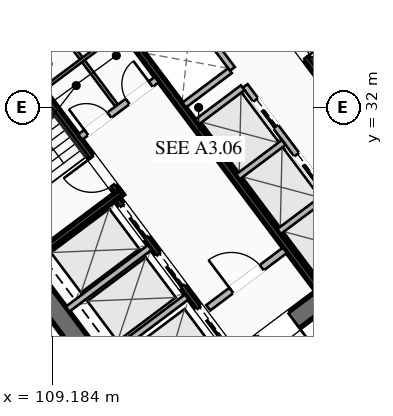
"""IFC4 building model, lengths in metres.
Left out: names, types, materials, properties, quantities, classifications, styles, units other than length and angle.
Written with IfcOpenShell. Run it as: python <this file> out.ifc"""

import sys

from ifc_helpers import new_model, si_unit, direction, frame, frame_2d, origin, place, context, subcontext, project, spatial, rectangle, extrude, element, fill, save


model = new_model("IFC4")
c1 = context("Model", 3, precision=1e-05, world=origin(), true_north=direction((0.0, 1.0)))
c2 = subcontext(c1, "Body", "Model", "MODEL_VIEW")
j1 = project(units=[si_unit("LENGTHUNIT", "METRE"), si_unit("PLANEANGLEUNIT", "RADIAN")], contexts=[c1])
p1 = place(None, origin())
s1 = spatial("IfcSite", under=j1, at=p1, CompositionType="ELEMENT")
p2 = place(p1, origin())
s2 = spatial("IfcBuilding", under=s1, at=p2, CompositionType="ELEMENT")
p3 = place(p2, frame((0.0, 0.0, 45.9)))
s3 = spatial("IfcBuildingStorey", under=s2, at=p3, CompositionType="ELEMENT", Elevation=45.9)
for number, where, z_axis, x_axis in (
    (1, (112.476, 21.107, 0.0), (0.0, 0.0, 1.0), (-0.6, 0.8, 0.0)),
    (2, (115.524, 42.893, 0.0), (0.0, 0.0, 1.0), (0.6, -0.8, 0.0)),
):
    element("IfcWall", number, at=place(p3, frame(where, z_axis=z_axis, x_axis=x_axis)), inside=s3, PredefinedType="SHEAR", context=c2, shape_type="SweptSolid", body=[
        extrude(rectangle(XDim=15.6, YDim=0.65, at=frame_2d((7.8, 0.0))), origin(), (0.0, 0.0, 1.0), 3.55),
    ])
p4 = place(p3, frame((124.429, 30.478, 0.0), z_axis=(0.0, 0.0, 1.0), x_axis=(-0.799998028465, -0.600002628705, 0.0)))
e3 = element("IfcWall", 3, at=p4, inside=s3, PredefinedType="SHEAR", context=c2, shape_type="SweptSolid", body=[
    extrude(rectangle(XDim=14.86, YDim=0.65, at=frame_2d((7.43, 0.0))), origin(), (0.0, 0.0, 1.0), 3.55),
])
p5 = place(p4, frame((9.13, 0.0, 0.0)))
e4 = element("IfcOpeningElement", 4, at=p5, cuts=e3, PredefinedType="OPENING", context=c2, shape_type="SweptSolid", body=[
    extrude(rectangle(XDim=1.25, YDim=2.25, at=frame_2d((0.625, 1.125))), frame((0.0, 0.335, 0.0), z_axis=(0.0, -1.0, 0.0), x_axis=(1.0, 0.0, 0.0)), (0.0, 0.0, 1.0), 0.67),
])
p6 = place(p4, frame((4.08, 0.0, 0.0)))
e5 = element("IfcOpeningElement", 5, at=p6, cuts=e3, PredefinedType="OPENING", context=c2, shape_type="SweptSolid", body=[
    extrude(rectangle(XDim=1.25, YDim=2.25, at=frame_2d((0.625, 1.125))), frame((0.0, 0.335, 0.0), z_axis=(0.0, -1.0, 0.0), x_axis=(1.0, 0.0, 0.0)), (0.0, 0.0, 1.0), 0.67),
])
p7 = place(p3, frame((103.571, 33.522, 0.0), z_axis=(0.0, 0.0, 1.0), x_axis=(0.799998028465, 0.600002628705, 0.0)))
e6 = element("IfcWall", 6, at=p7, inside=s3, PredefinedType="SHEAR", context=c2, shape_type="SweptSolid", body=[
    extrude(rectangle(XDim=14.86, YDim=0.65, at=frame_2d((7.43, 0.0))), origin(), (0.0, 0.0, 1.0), 3.55),
])
p8 = place(p7, frame((4.48, 0.0, 0.0)))
e7 = element("IfcOpeningElement", 7, at=p8, cuts=e6, PredefinedType="OPENING", context=c2, shape_type="SweptSolid", body=[
    extrude(rectangle(XDim=1.25, YDim=2.25, at=frame_2d((0.625, 1.125))), frame((0.0, 0.335, 0.0), z_axis=(0.0, -1.0, 0.0), x_axis=(1.0, 0.0, 0.0)), (0.0, 0.0, 1.0), 0.67),
])
p9 = place(p7, frame((9.53, 0.0, 0.0)))
e8 = element("IfcOpeningElement", 8, at=p9, cuts=e6, PredefinedType="OPENING", context=c2, shape_type="SweptSolid", body=[
    extrude(rectangle(XDim=1.25, YDim=2.25, at=frame_2d((0.625, 1.125))), frame((0.0, 0.335, 0.0), z_axis=(0.0, -1.0, 0.0), x_axis=(1.0, 0.0, 0.0)), (0.0, 0.0, 1.0), 0.67),
])
p10 = place(p3, frame((111.44, 29.08, 0.0), z_axis=(0.0, 0.0, 1.0), x_axis=(-0.600009827119, 0.799992629566, 0.0)))
e9 = element("IfcWall", 9, at=p10, inside=s3, PredefinedType="SHEAR", context=c2, shape_type="SweptSolid", body=[
    extrude(rectangle(XDim=7.95, YDim=0.2, at=frame_2d((3.975, 0.0))), origin(), (0.0, 0.0, 1.0), 3.35),
])
p11 = place(p10, frame((0.45, 0.0, 0.0)))
e10 = element("IfcOpeningElement", 10, at=p11, cuts=e9, PredefinedType="OPENING", context=c2, shape_type="SweptSolid", body=[
    extrude(rectangle(XDim=1.15, YDim=2.2, at=frame_2d((0.575, 1.1))), frame((0.0, 0.11, 0.0), z_axis=(0.0, -1.0, 0.0), x_axis=(1.0, 0.0, 0.0)), (0.0, 0.0, 1.0), 0.22),
])
p12 = place(p3, frame((108.476, 26.982, 0.0), z_axis=(0.0, 0.0, 1.0), x_axis=(0.799984290658, 0.600020945218, 0.0)))
e11 = element("IfcWall", 11, at=p12, inside=s3, PredefinedType="SHEAR", context=c2, shape_type="SweptSolid", body=[
    extrude(rectangle(XDim=3.73, YDim=0.2, at=frame_2d((1.865, 0.0))), origin(), (0.0, 0.0, 1.0), 3.35),
])
p13 = place(p3, frame((116.56, 34.92, 0.0), z_axis=(0.0, 0.0, 1.0), x_axis=(0.600009827119, -0.799992629566, 0.0)))
e12 = element("IfcWall", 12, at=p13, inside=s3, PredefinedType="SHEAR", context=c2, shape_type="SweptSolid", body=[
    extrude(rectangle(XDim=7.95, YDim=0.2, at=frame_2d((3.975, 0.0))), origin(), (0.0, 0.0, 1.0), 3.35),
])
p14 = place(p13, frame((0.45, 0.0, 0.0)))
e13 = element("IfcOpeningElement", 13, at=p14, cuts=e12, PredefinedType="OPENING", context=c2, shape_type="SweptSolid", body=[
    extrude(rectangle(XDim=1.15, YDim=2.2, at=frame_2d((0.575, 1.1))), frame((0.0, 0.11, 0.0), z_axis=(0.0, -1.0, 0.0), x_axis=(1.0, 0.0, 0.0)), (0.0, 0.0, 1.0), 0.22),
])
p15 = place(p3, frame((117.938, 26.016, 0.0), z_axis=(0.0, 0.0, 1.0), x_axis=(-0.600005463273, 0.799995902516, 0.0)))
e14 = element("IfcWall", 14, at=p15, inside=s3, PredefinedType="SHEAR", context=c2, shape_type="SweptSolid", body=[
    extrude(rectangle(XDim=14.3, YDim=0.2, at=frame_2d((7.15, 0.0))), origin(), (0.0, 0.0, 1.0), 3.35),
])
p16 = place(p3, frame((110.104, 31.028, 0.0), z_axis=(0.0, 0.0, 1.0), x_axis=(0.800018601094, 0.59997519774, 0.0)))
e15 = element("IfcWall", 15, at=p16, inside=s3, PredefinedType="SOLIDWALL", context=c2, shape_type="SweptSolid", body=[
    extrude(rectangle(XDim=3.15, YDim=0.22, at=frame_2d((1.575, 0.0))), origin(), (0.0, 0.0, 1.0), 2.703),
])
p17 = place(p16, frame((0.25, 0.0, 0.0)))
e16 = element("IfcOpeningElement", 16, at=p17, cuts=e15, PredefinedType="OPENING", context=c2, shape_type="SweptSolid", body=[
    extrude(rectangle(XDim=0.95, YDim=2.05, at=frame_2d((0.475, 1.025))), frame((0.0, 0.12, 0.0), z_axis=(0.0, -1.0, 0.0), x_axis=(1.0, 0.0, 0.0)), (0.0, 0.0, 1.0), 0.24),
])
p18 = place(p16, frame((1.95, 0.0, 0.0)))
e17 = element("IfcOpeningElement", 17, at=p18, cuts=e15, PredefinedType="OPENING", context=c2, shape_type="SweptSolid", body=[
    extrude(rectangle(XDim=0.95, YDim=2.05, at=frame_2d((0.475, 1.025))), frame((0.0, 0.12, 0.0), z_axis=(0.0, -1.0, 0.0), x_axis=(1.0, 0.0, 0.0)), (0.0, 0.0, 1.0), 0.24),
])
p19 = place(p3, frame((114.316, 25.412, 0.0), z_axis=(0.0, 0.0, 1.0), x_axis=(0.800018601094, 0.59997519774, 0.0)))
e18 = element("IfcWall", 18, at=p19, inside=s3, PredefinedType="SOLIDWALL", context=c2, shape_type="SweptSolid", body=[
    extrude(rectangle(XDim=3.15, YDim=0.22, at=frame_2d((1.575, 0.0))), origin(), (0.0, 0.0, 1.0), 2.703),
])
p20 = place(p19, frame((0.95, 0.0, 0.0)))
e19 = element("IfcOpeningElement", 19, at=p20, cuts=e18, PredefinedType="OPENING", context=c2, shape_type="SweptSolid", body=[
    extrude(rectangle(XDim=1.25, YDim=2.25, at=frame_2d((0.625, 1.125))), frame((0.0, 0.12, 0.0), z_axis=(0.0, -1.0, 0.0), x_axis=(1.0, 0.0, 0.0)), (0.0, 0.0, 1.0), 0.24),
])
p21 = place(p3, frame((115.13, 23.91, 0.0), z_axis=(0.0, 0.0, 1.0), x_axis=(-0.599975393228, 0.800018454488, 0.0)))
e20 = element("IfcWall", 20, at=p21, inside=s3, PredefinedType="SHEAR", context=c2, shape_type="SweptSolid", body=[
    extrude(rectangle(XDim=6.35, YDim=0.2, at=frame_2d((3.175, 0.0))), origin(), (0.0, 0.0, 1.0), 3.35),
])
p22 = place(p21, frame((4.775, 0.0, 0.0)))
e21 = element("IfcOpeningElement", 21, at=p22, cuts=e20, PredefinedType="OPENING", context=c2, shape_type="SweptSolid", body=[
    extrude(rectangle(XDim=1.3, YDim=2.25, at=frame_2d((0.65, 1.125))), frame((0.0, 0.11, 0.0), z_axis=(0.0, -1.0, 0.0), x_axis=(1.0, 0.0, 0.0)), (0.0, 0.0, 1.0), 0.22),
])
p23 = place(p21, frame((2.775, 0.0, 0.0)))
e22 = element("IfcOpeningElement", 22, at=p23, cuts=e20, PredefinedType="OPENING", context=c2, shape_type="SweptSolid", body=[
    extrude(rectangle(XDim=1.3, YDim=2.25, at=frame_2d((0.65, 1.125))), frame((0.0, 0.11, 0.0), z_axis=(0.0, -1.0, 0.0), x_axis=(1.0, 0.0, 0.0)), (0.0, 0.0, 1.0), 0.22),
])
p24 = place(p21, frame((0.575, 0.0, 0.0)))
e23 = element("IfcOpeningElement", 23, at=p24, cuts=e20, PredefinedType="OPENING", context=c2, shape_type="SweptSolid", body=[
    extrude(rectangle(XDim=1.3, YDim=2.25, at=frame_2d((0.65, 1.125))), frame((0.0, 0.11, 0.0), z_axis=(0.0, -1.0, 0.0), x_axis=(1.0, 0.0, 0.0)), (0.0, 0.0, 1.0), 0.22),
])
for number, where, z_axis, x_axis in (
    (24, (110.906, 23.742, 0.0), (0.0, 0.0, 1.0), (0.8, 0.6, 0.0)),
    (25, (109.688, 25.366, 0.0), (0.0, 0.0, 1.0), (0.8, 0.6, 0.0)),
):
    element("IfcWall", number, at=place(p3, frame(where, z_axis=z_axis, x_axis=x_axis)), inside=s3, PredefinedType="SOLIDWALL", context=c2, shape_type="SweptSolid", body=[
        extrude(rectangle(XDim=3.38, YDim=0.2, at=frame_2d((1.69, 0.0))), origin(), (0.0, 0.0, 1.0), 3.35),
    ])
p25 = place(p3, frame((111.296, 32.072, 0.0), z_axis=(0.0, 0.0, 1.0), x_axis=(-0.59995887973, 0.800030838552, 0.0)))
e26 = element("IfcWall", 26, at=p25, inside=s3, PredefinedType="PARTITIONING", context=c2, shape_type="SweptSolid", body=[
    extrude(rectangle(XDim=3.8, YDim=0.11, at=frame_2d((1.9, 0.0))), origin(), (0.0, 0.0, 1.0), 2.703),
])
p26 = place(p3, frame((108.91, 32.62, 0.0), z_axis=(0.0, 0.0, 1.0), x_axis=(0.800018601094, 0.59997519774, 0.0)))
e27 = element("IfcWall", 27, at=p26, inside=s3, PredefinedType="PARTITIONING", context=c2, shape_type="SweptSolid", body=[
    extrude(rectangle(XDim=3.15, YDim=0.11, at=frame_2d((1.575, 0.0))), origin(), (0.0, 0.0, 1.0), 2.703),
])
p27 = place(p3, frame((119.61, 27.27, 0.0), z_axis=(0.0, 0.0, 1.0), x_axis=(-0.600011488909, 0.79999138319, 0.0)))
e28 = element("IfcWall", 28, at=p27, inside=s3, PredefinedType="SOLIDWALL", context=c2, shape_type="SweptSolid", body=[
    extrude(rectangle(XDim=6.8, YDim=0.2, at=frame_2d((3.4, 0.0))), origin(), (0.0, 0.0, 1.0), 3.35),
])
p28 = place(p27, frame((0.625, 0.0, 0.0)))
e29 = element("IfcOpeningElement", 29, at=p28, cuts=e28, PredefinedType="OPENING", context=c2, shape_type="SweptSolid", body=[
    extrude(rectangle(XDim=1.1, YDim=2.2, at=frame_2d((0.55, 1.1))), frame((0.0, 0.11, 0.0), z_axis=(0.0, -1.0, 0.0), x_axis=(1.0, 0.0, 0.0)), (0.0, 0.0, 1.0), 0.22),
])
p29 = place(p27, frame((2.875, 0.0, 0.0)))
e30 = element("IfcOpeningElement", 30, at=p29, cuts=e28, PredefinedType="OPENING", context=c2, shape_type="SweptSolid", body=[
    extrude(rectangle(XDim=1.1, YDim=2.2, at=frame_2d((0.55, 1.1))), frame((0.0, 0.11, 0.0), z_axis=(0.0, -1.0, 0.0), x_axis=(1.0, 0.0, 0.0)), (0.0, 0.0, 1.0), 0.22),
])
p30 = place(p27, frame((5.125, 0.0, 0.0)))
e31 = element("IfcOpeningElement", 31, at=p30, cuts=e28, PredefinedType="OPENING", context=c2, shape_type="SweptSolid", body=[
    extrude(rectangle(XDim=1.1, YDim=2.2, at=frame_2d((0.55, 1.1))), frame((0.0, 0.11, 0.0), z_axis=(0.0, -1.0, 0.0), x_axis=(1.0, 0.0, 0.0)), (0.0, 0.0, 1.0), 0.22),
])
p31 = place(p3, frame((116.646, 27.922, 0.0), z_axis=(0.0, 0.0, 1.0), x_axis=(0.8, 0.6, 0.0)))
e32 = element("IfcWall", 32, at=p31, inside=s3, PredefinedType="SOLIDWALL", context=c2, shape_type="SweptSolid", body=[
    extrude(rectangle(XDim=1.88, YDim=0.2, at=frame_2d((0.94, 0.0))), origin(), (0.0, 0.0, 1.0), 3.35),
])
p32 = place(p3, frame((115.296, 29.722, 0.0), z_axis=(0.0, 0.0, 1.0), x_axis=(0.799984418148, 0.600020775241, 0.0)))
e33 = element("IfcWall", 33, at=p32, inside=s3, PredefinedType="SOLIDWALL", context=c2, shape_type="SweptSolid", body=[
    extrude(rectangle(XDim=1.88, YDim=0.2, at=frame_2d((0.94, 0.0))), origin(), (0.0, 0.0, 1.0), 3.35),
])
p33 = place(p3, frame((113.946, 31.522, 0.0), z_axis=(0.0, 0.0, 1.0), x_axis=(0.8, 0.6, 0.0)))
e34 = element("IfcWall", 34, at=p33, inside=s3, PredefinedType="SOLIDWALL", context=c2, shape_type="SweptSolid", body=[
    extrude(rectangle(XDim=1.88, YDim=0.2, at=frame_2d((0.94, 0.0))), origin(), (0.0, 0.0, 1.0), 3.35),
])
p34 = place(p3, frame((115.11, 33.27, 0.0), z_axis=(0.0, 0.0, 1.0), x_axis=(-0.600011488909, 0.79999138319, 0.0)))
e35 = element("IfcWall", 35, at=p34, inside=s3, PredefinedType="SOLIDWALL", context=c2, shape_type="SweptSolid", body=[
    extrude(rectangle(XDim=6.8, YDim=0.2, at=frame_2d((3.4, 0.0))), origin(), (0.0, 0.0, 1.0), 3.35),
])
p35 = place(p3, frame((113.526, 32.082, 0.0), z_axis=(0.0, 0.0, 1.0), x_axis=(0.800046745961, 0.599937666993, 0.0)))
e36 = element("IfcWall", 36, at=p35, inside=s3, PredefinedType="SOLIDWALL", context=c2, shape_type="SweptSolid", body=[
    extrude(rectangle(XDim=1.88, YDim=0.2, at=frame_2d((0.94, 0.0))), origin(), (0.0, 0.0, 1.0), 3.35),
])
p36 = place(p3, frame((112.176, 33.882, 0.0), z_axis=(0.0, 0.0, 1.0), x_axis=(0.8, 0.6, 0.0)))
e37 = element("IfcWall", 37, at=p36, inside=s3, PredefinedType="SOLIDWALL", context=c2, shape_type="SweptSolid", body=[
    extrude(rectangle(XDim=1.88, YDim=0.2, at=frame_2d((0.94, 0.0))), origin(), (0.0, 0.0, 1.0), 3.35),
])
p37 = place(p3, frame((135.46, 34.47, 0.0), z_axis=(0.0, 0.0, 1.0), x_axis=(-0.800000982127, -0.599998690494, 0.0)))
e38 = element("IfcWall", 38, at=p37, inside=s3, PredefinedType="PARTITIONING", context=c2, shape_type="SweptSolid", body=[
    extrude(rectangle(XDim=29.83, YDim=0.135, at=frame_2d((14.915, 0.0))), origin(), (0.0, 0.0, 1.0), 2.703),
])
p38 = place(p37, frame((28.5, 0.0, 0.0)))
e39 = element("IfcOpeningElement", 39, at=p38, cuts=e38, PredefinedType="OPENING", context=c2, shape_type="SweptSolid", body=[
    extrude(rectangle(XDim=0.95, YDim=2.05, at=frame_2d((0.475, 1.025))), frame((0.0, 0.077, 0.0), z_axis=(0.0, -1.0, 0.0), x_axis=(1.0, 0.0, 0.0)), (0.0, 0.0, 1.0), 0.155),
])
p39 = place(p37, frame((17.892, 0.0, 0.0)))
e40 = element("IfcOpeningElement", 40, at=p39, cuts=e38, PredefinedType="OPENING", context=c2, shape_type="SweptSolid", body=[
    extrude(rectangle(XDim=0.95, YDim=2.05, at=frame_2d((0.475, 1.025))), frame((0.0, 0.077, 0.0), z_axis=(0.0, -1.0, 0.0), x_axis=(1.0, 0.0, 0.0)), (0.0, 0.0, 1.0), 0.155),
])
p40 = place(p37, frame((0.38, 0.0, 0.0)))
e41 = element("IfcOpeningElement", 41, at=p40, cuts=e38, PredefinedType="OPENING", context=c2, shape_type="SweptSolid", body=[
    extrude(rectangle(XDim=0.95, YDim=2.05, at=frame_2d((0.475, 1.025))), frame((0.0, 0.077, 0.0), z_axis=(0.0, -1.0, 0.0), x_axis=(1.0, 0.0, 0.0)), (0.0, 0.0, 1.0), 0.155),
])
p41 = place(p3, frame((111.548, 16.636, 0.0), z_axis=(0.0, 0.0, 1.0), x_axis=(-0.600003610192, 0.799997292343, 0.0)))
e42 = element("IfcWall", 42, at=p41, inside=s3, PredefinedType="PARTITIONING", context=c2, shape_type="SweptSolid", body=[
    extrude(rectangle(XDim=21.64, YDim=0.135, at=frame_2d((10.82, 0.0))), origin(), (0.0, 0.0, 1.0), 2.703),
])
p42 = place(p41, frame((0.3, 0.0, 0.0)))
e43 = element("IfcOpeningElement", 43, at=p42, cuts=e42, PredefinedType="OPENING", context=c2, shape_type="SweptSolid", body=[
    extrude(rectangle(XDim=0.95, YDim=2.05, at=frame_2d((0.475, 1.025))), frame((0.0, 0.077, 0.0), z_axis=(0.0, -1.0, 0.0), x_axis=(1.0, 0.0, 0.0)), (0.0, 0.0, 1.0), 0.155),
])
p43 = place(p5, origin())
e44 = element("IfcDoor", 44, at=p43, inside=s3, OperationType="SINGLE_SWING_LEFT", PredefinedType="DOOR", context=c2, shape_type="SweptSolid", body=[
    extrude(rectangle(XDim=1.25, YDim=2.25, at=frame_2d((0.625, 1.125))), frame((0.0, 0.025, 0.0), z_axis=(0.0, -1.0, 0.0), x_axis=(1.0, 0.0, 0.0)), (0.0, 0.0, 1.0), 0.05),
])
fill(e4, e44)
p44 = place(p11, origin())
e45 = element("IfcDoor", 45, at=p44, inside=s3, OperationType="SINGLE_SWING_RIGHT", PredefinedType="DOOR", context=c2, shape_type="SweptSolid", body=[
    extrude(rectangle(XDim=1.15, YDim=2.2, at=frame_2d((0.575, 1.1))), frame((0.0, 0.025, 0.0), z_axis=(0.0, -1.0, 0.0), x_axis=(1.0, 0.0, 0.0)), (0.0, 0.0, 1.0), 0.05),
])
fill(e10, e45)
p45 = place(p14, origin())
e46 = element("IfcDoor", 46, at=p45, inside=s3, OperationType="SINGLE_SWING_RIGHT", PredefinedType="DOOR", context=c2, shape_type="SweptSolid", body=[
    extrude(rectangle(XDim=1.15, YDim=2.2, at=frame_2d((0.575, 1.1))), frame((0.0, 0.025, 0.0), z_axis=(0.0, -1.0, 0.0), x_axis=(1.0, 0.0, 0.0)), (0.0, 0.0, 1.0), 0.05),
])
fill(e13, e46)
p46 = place(p20, origin())
e47 = element("IfcDoor", 47, at=p46, inside=s3, OperationType="SINGLE_SWING_LEFT", PredefinedType="DOOR", context=c2, shape_type="SweptSolid", body=[
    extrude(rectangle(XDim=1.25, YDim=2.25, at=frame_2d((0.625, 1.125))), frame((0.0, 0.025, 0.0), z_axis=(0.0, -1.0, 0.0), x_axis=(1.0, 0.0, 0.0)), (0.0, 0.0, 1.0), 0.05),
])
fill(e19, e47)
p47 = place(p17, origin())
e48 = element("IfcDoor", 48, at=p47, inside=s3, OperationType="SINGLE_SWING_LEFT", PredefinedType="DOOR", context=c2, shape_type="SweptSolid", body=[
    extrude(rectangle(XDim=0.95, YDim=2.05, at=frame_2d((0.475, 1.025))), frame((0.0, 0.025, 0.0), z_axis=(0.0, -1.0, 0.0), x_axis=(1.0, 0.0, 0.0)), (0.0, 0.0, 1.0), 0.05),
])
fill(e16, e48)
p48 = place(p18, origin())
e49 = element("IfcDoor", 49, at=p48, inside=s3, OperationType="SINGLE_SWING_RIGHT", PredefinedType="DOOR", context=c2, shape_type="SweptSolid", body=[
    extrude(rectangle(XDim=0.95, YDim=2.05, at=frame_2d((0.475, 1.025))), frame((0.0, 0.025, 0.0), z_axis=(0.0, -1.0, 0.0), x_axis=(1.0, 0.0, 0.0)), (0.0, 0.0, 1.0), 0.05),
])
fill(e17, e49)
p49 = place(p22, origin())
e50 = element("IfcDoor", 50, at=p49, inside=s3, OperationType="SLIDING_TO_LEFT", PredefinedType="DOOR", context=c2, shape_type="SweptSolid", body=[
    extrude(rectangle(XDim=1.3, YDim=2.25, at=frame_2d((0.65, 1.125))), frame((0.0, 0.025, 0.0), z_axis=(0.0, -1.0, 0.0), x_axis=(1.0, 0.0, 0.0)), (0.0, 0.0, 1.0), 0.05),
])
fill(e21, e50)
p50 = place(p23, origin())
e51 = element("IfcDoor", 51, at=p50, inside=s3, OperationType="SLIDING_TO_LEFT", PredefinedType="DOOR", context=c2, shape_type="SweptSolid", body=[
    extrude(rectangle(XDim=1.3, YDim=2.25, at=frame_2d((0.65, 1.125))), frame((0.0, 0.025, 0.0), z_axis=(0.0, -1.0, 0.0), x_axis=(1.0, 0.0, 0.0)), (0.0, 0.0, 1.0), 0.05),
])
fill(e22, e51)
p51 = place(p24, origin())
e52 = element("IfcDoor", 52, at=p51, inside=s3, OperationType="SLIDING_TO_LEFT", PredefinedType="DOOR", context=c2, shape_type="SweptSolid", body=[
    extrude(rectangle(XDim=1.3, YDim=2.25, at=frame_2d((0.65, 1.125))), frame((0.0, 0.025, 0.0), z_axis=(0.0, -1.0, 0.0), x_axis=(1.0, 0.0, 0.0)), (0.0, 0.0, 1.0), 0.05),
])
fill(e23, e52)
p52 = place(p29, origin())
e53 = element("IfcDoor", 53, at=p52, inside=s3, OperationType="SLIDING_TO_LEFT", PredefinedType="DOOR", context=c2, shape_type="SweptSolid", body=[
    extrude(rectangle(XDim=1.1, YDim=2.2, at=frame_2d((0.55, 1.1))), frame((0.0, 0.025, 0.0), z_axis=(0.0, -1.0, 0.0), x_axis=(1.0, 0.0, 0.0)), (0.0, 0.0, 1.0), 0.05),
])
fill(e30, e53)
p53 = place(p30, origin())
e54 = element("IfcDoor", 54, at=p53, inside=s3, OperationType="SLIDING_TO_LEFT", PredefinedType="DOOR", context=c2, shape_type="SweptSolid", body=[
    extrude(rectangle(XDim=1.1, YDim=2.2, at=frame_2d((0.55, 1.1))), frame((0.0, 0.025, 0.0), z_axis=(0.0, -1.0, 0.0), x_axis=(1.0, 0.0, 0.0)), (0.0, 0.0, 1.0), 0.05),
])
fill(e31, e54)
save(model, sys.argv[1])
